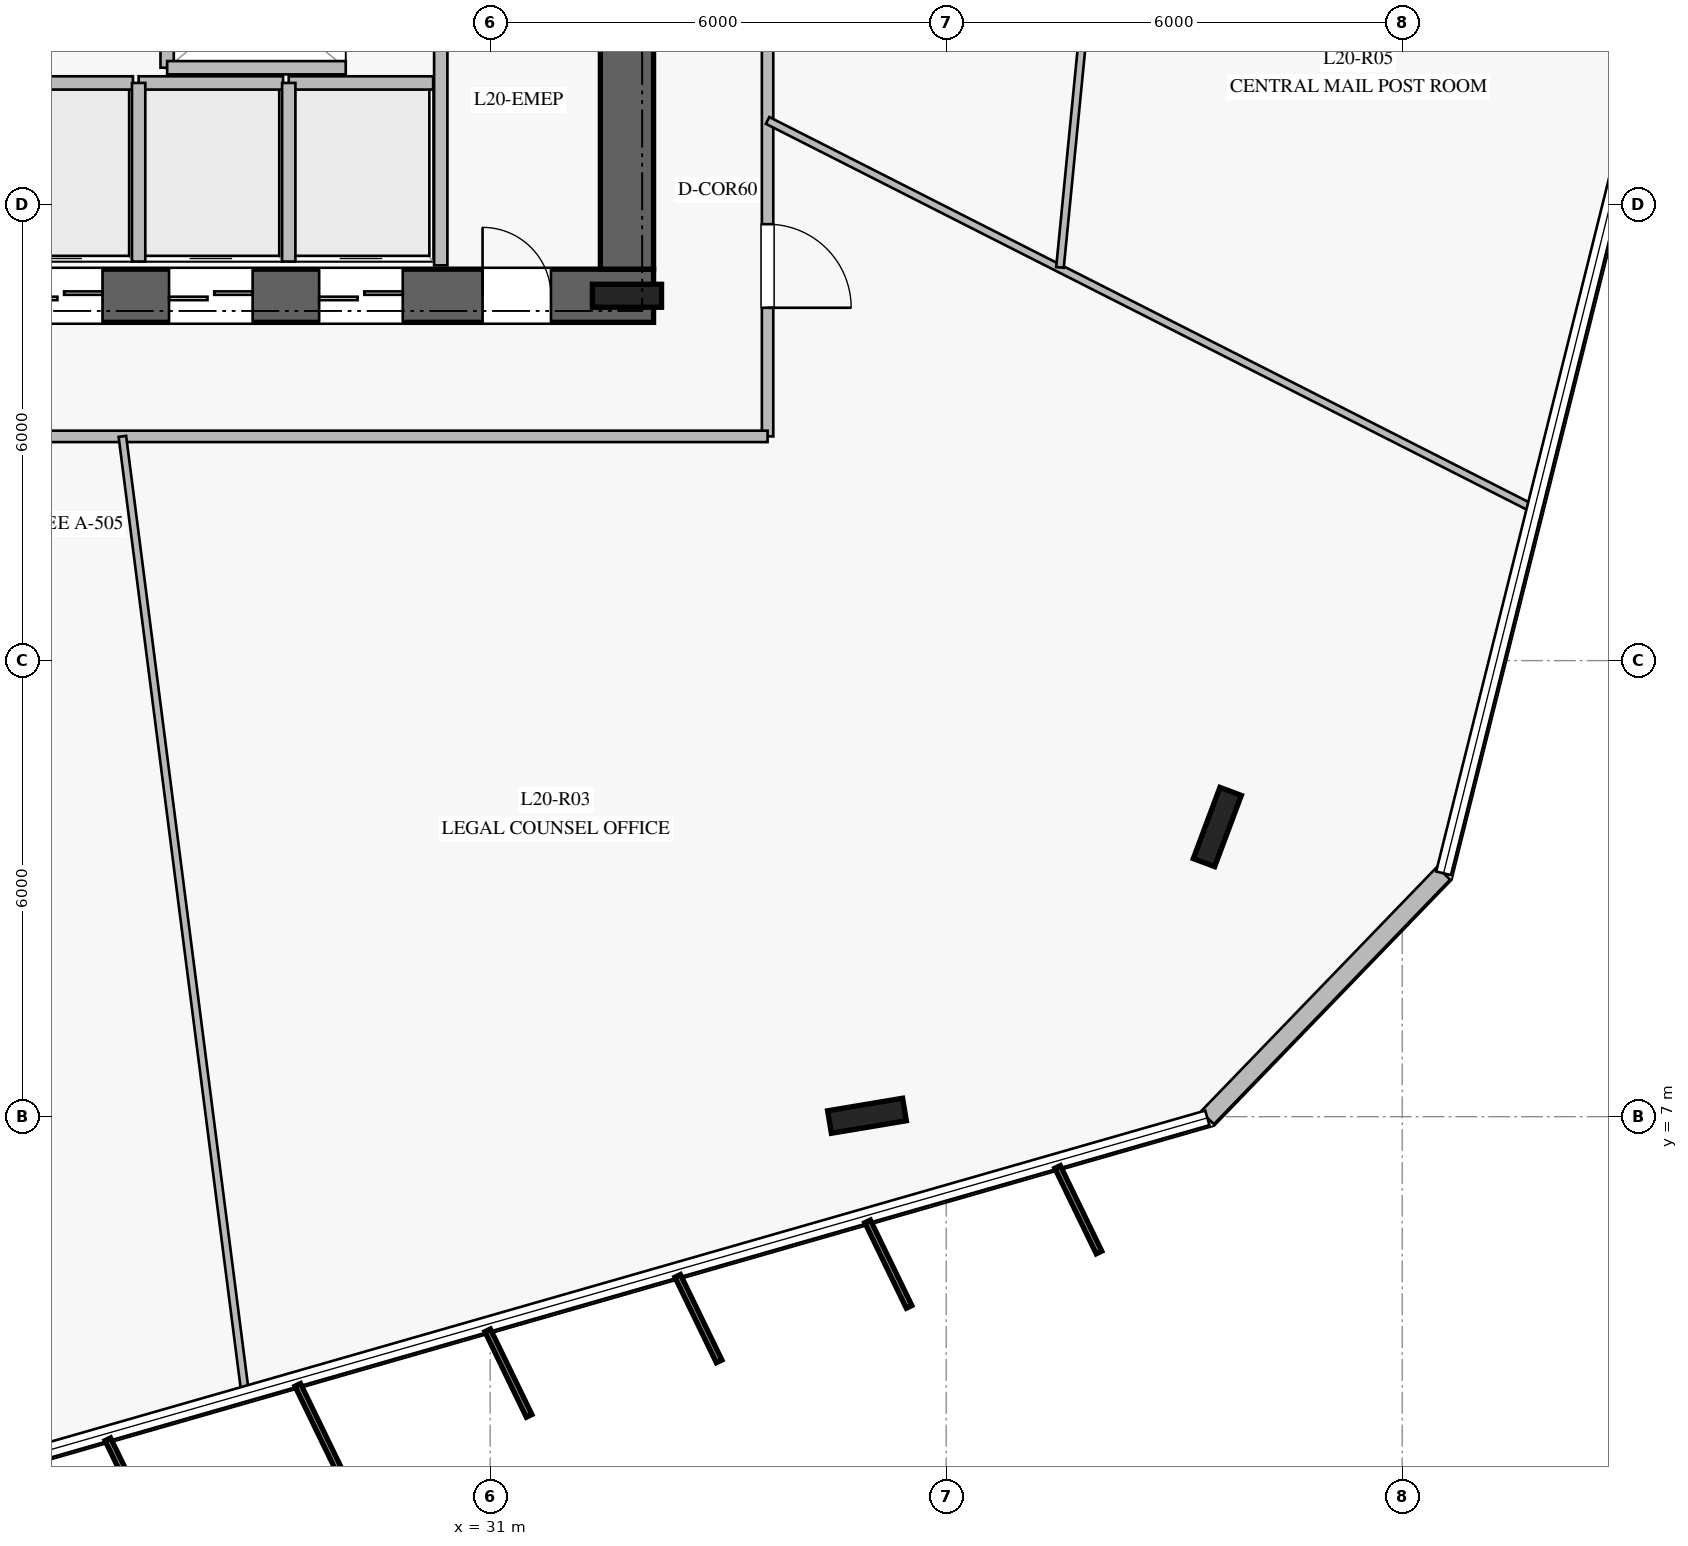
"""IFC4 building model, lengths in metres.
Left out: names, types, materials, properties, quantities, classifications, styles, units other than length and angle.
Written with IfcOpenShell. Run it as: python <this file> out.ifc"""

import sys

from ifc_helpers import new_model, si_unit, direction, frame, frame_2d, origin, origin_2d, place, context, subcontext, project, spatial, rectangle, i_section, extrude, element, fill, save


model = new_model("IFC4")
c1 = context("Model", 3, precision=1e-05, world=origin(), true_north=direction((0.0, 1.0)))
c2 = subcontext(c1, "Body", "Model", "MODEL_VIEW")
j1 = project(units=[si_unit("LENGTHUNIT", "METRE"), si_unit("PLANEANGLEUNIT", "RADIAN")], contexts=[c1])
p1 = place(None, origin())
s1 = spatial("IfcSite", under=j1, at=p1, CompositionType="ELEMENT")
p2 = place(p1, origin())
s2 = spatial("IfcBuilding", under=s1, at=p2, CompositionType="ELEMENT")
p3 = place(p2, frame((0.0, 0.0, 84.0)))
s3 = spatial("IfcBuildingStorey", under=s2, at=p3, CompositionType="ELEMENT", Elevation=84.0)
p4 = place(p3, frame((16.85, 17.8, 0.0), z_axis=(0.0, 0.0, 1.0), x_axis=(1.0, 0.0, 0.0)))
e1 = element("IfcWall", 1, at=p4, inside=s3, PredefinedType="SHEAR", context=c2, shape_type="SweptSolid", body=[
    extrude(rectangle(XDim=16.3, YDim=0.7, at=frame_2d((8.15, 0.0))), origin(), (0.0, 0.0, 1.0), 3.76),
])
p5 = place(p4, frame((5.1, 0.0, 0.0)))
e2 = element("IfcOpeningElement", 2, at=p5, cuts=e1, PredefinedType="OPENING", context=c2, shape_type="SweptSolid", body=[
    extrude(rectangle(XDim=1.2, YDim=2.25, at=frame_2d((0.6, 1.125))), frame((0.0, 0.36, 0.0), z_axis=(0.0, -1.0, 0.0), x_axis=(1.0, 0.0, 0.0)), (0.0, 0.0, 1.0), 0.72),
])
p6 = place(p4, frame((14.05, 0.0, 0.0)))
e3 = element("IfcOpeningElement", 3, at=p6, cuts=e1, PredefinedType="OPENING", context=c2, shape_type="SweptSolid", body=[
    extrude(rectangle(XDim=0.9, YDim=2.1, at=frame_2d((0.45, 1.05))), frame((0.0, 0.36, 0.0), z_axis=(0.0, -1.0, 0.0), x_axis=(1.0, 0.0, 0.0)), (0.0, 0.0, 1.0), 0.72),
])
p7 = place(p4, frame((7.95, 0.0, 0.0)))
e4 = element("IfcOpeningElement", 4, at=p7, cuts=e1, PredefinedType="OPENING", context=c2, shape_type="SweptSolid", body=[
    extrude(rectangle(XDim=1.1, YDim=2.2, at=frame_2d((0.55, 1.1))), frame((0.0, 0.36, 0.0), z_axis=(0.0, -1.0, 0.0), x_axis=(1.0, 0.0, 0.0)), (0.0, 0.0, 1.0), 0.72),
])
p8 = place(p4, frame((9.925, 0.0, 0.0)))
e5 = element("IfcOpeningElement", 5, at=p8, cuts=e1, PredefinedType="OPENING", context=c2, shape_type="SweptSolid", body=[
    extrude(rectangle(XDim=1.1, YDim=2.2, at=frame_2d((0.55, 1.1))), frame((0.0, 0.36, 0.0), z_axis=(0.0, -1.0, 0.0), x_axis=(1.0, 0.0, 0.0)), (0.0, 0.0, 1.0), 0.72),
])
p9 = place(p4, frame((11.9, 0.0, 0.0)))
e6 = element("IfcOpeningElement", 6, at=p9, cuts=e1, PredefinedType="OPENING", context=c2, shape_type="SweptSolid", body=[
    extrude(rectangle(XDim=1.1, YDim=2.2, at=frame_2d((0.55, 1.1))), frame((0.0, 0.36, 0.0), z_axis=(0.0, -1.0, 0.0), x_axis=(1.0, 0.0, 0.0)), (0.0, 0.0, 1.0), 0.72),
])
p10 = place(p3, frame((32.8, 18.15, 0.0), z_axis=(0.0, 0.0, 1.0), x_axis=(0.0, 1.0, 0.0)))
e7 = element("IfcWall", 7, at=p10, inside=s3, PredefinedType="SHEAR", context=c2, shape_type="SweptSolid", body=[
    extrude(rectangle(XDim=13.7, YDim=0.7, at=frame_2d((6.85, 0.0))), origin(), (0.0, 0.0, 1.0), 3.76),
])
p11 = place(p3, frame((32.8, 17.8, 0.0), z_axis=(0.0, 0.0, 1.0), x_axis=(1.0, 0.0, 0.0)))
e8 = element("IfcColumn", 8, at=p11, inside=s3, PredefinedType="COLUMN", context=c2, shape_type="SweptSolid", body=[
    extrude(i_section(OverallWidth=0.302, OverallDepth=0.91, WebThickness=0.021, FlangeThickness=0.04, at=origin_2d()), origin(), (0.0, 0.0, 1.0), 4.0),
])
for number, where, z_axis, x_axis in (
    (9, (35.958, 7.012, 0.0), (0.0, 0.0, 1.0), (0.986, 0.165, 0.0)),
    (10, (40.567, 10.811, 0.0), (0.0, 0.0, 1.0), (0.35, 0.937, 0.0)),
):
    element("IfcColumn", number, at=place(p3, frame(where, z_axis=z_axis, x_axis=x_axis)), inside=s3, PredefinedType="COLUMN", context=c2, shape_type="SweptSolid", body=[
        extrude(i_section(OverallWidth=0.3, OverallDepth=1.0, WebThickness=0.019, FlangeThickness=0.036, at=origin_2d()), origin(), (0.0, 0.0, 1.0), 4.0),
    ])
p12 = place(p3, frame((40.436, 6.984, 0.0), z_axis=(0.0, 0.0, 1.0), x_axis=(0.694693843806, 0.719305542435, 0.0)))
e11 = element("IfcWall", 11, at=p12, inside=s3, PredefinedType="STANDARD", context=c2, shape_type="SweptSolid", body=[
    extrude(rectangle(XDim=4.474, YDim=0.24, at=frame_2d((2.237, 0.0))), origin(), (0.0, 0.0, 1.0), 3.76),
])
p13 = place(p3, frame((30.35, 18.2, 0.0), z_axis=(0.0, 0.0, 1.0), x_axis=(0.0, 1.0, 0.0)))
e12 = element("IfcWall", 12, at=p13, inside=s3, PredefinedType="PARTITIONING", context=c2, shape_type="SweptSolid", body=[
    extrude(rectangle(XDim=3.48, YDim=0.175, at=frame_2d((1.74, 0.0))), origin(), (0.0, 0.0, 1.0), 3.76),
])
p14 = place(p3, frame((24.4, 20.6, 0.0), z_axis=(0.0, 0.0, 1.0), x_axis=(1.0, 0.0, 0.0)))
e13 = element("IfcWall", 13, at=p14, inside=s3, PredefinedType="PARTITIONING", context=c2, shape_type="SweptSolid", body=[
    extrude(rectangle(XDim=1.9, YDim=0.175, at=frame_2d((0.95, 0.0))), origin(), (0.0, 0.0, 1.0), 3.76),
])
p15 = place(p3, frame((26.375, 20.6, 0.0), z_axis=(0.0, 0.0, 1.0), x_axis=(1.0, 0.0, 0.0)))
e14 = element("IfcWall", 14, at=p15, inside=s3, PredefinedType="PARTITIONING", context=c2, shape_type="SweptSolid", body=[
    extrude(rectangle(XDim=1.9, YDim=0.175, at=frame_2d((0.95, 0.0))), origin(), (0.0, 0.0, 1.0), 3.76),
])
p16 = place(p3, frame((26.375, 18.25, 0.0), z_axis=(0.0, 0.0, 1.0), x_axis=(0.0, 1.0, 0.0)))
e15 = element("IfcWall", 15, at=p16, inside=s3, PredefinedType="PARTITIONING", context=c2, shape_type="SweptSolid", body=[
    extrude(rectangle(XDim=2.35, YDim=0.175, at=frame_2d((1.175, 0.0))), origin(), (0.0, 0.0, 1.0), 3.76),
])
p17 = place(p3, frame((28.35, 20.6, 0.0), z_axis=(0.0, 0.0, 1.0), x_axis=(1.0, 0.0, 0.0)))
e16 = element("IfcWall", 16, at=p17, inside=s3, PredefinedType="PARTITIONING", context=c2, shape_type="SweptSolid", body=[
    extrude(rectangle(XDim=1.9, YDim=0.175, at=frame_2d((0.95, 0.0))), origin(), (0.0, 0.0, 1.0), 3.76),
])
p18 = place(p3, frame((28.35, 18.25, 0.0), z_axis=(0.0, 0.0, 1.0), x_axis=(0.0, 1.0, 0.0)))
e17 = element("IfcWall", 17, at=p18, inside=s3, PredefinedType="PARTITIONING", context=c2, shape_type="SweptSolid", body=[
    extrude(rectangle(XDim=2.35, YDim=0.175, at=frame_2d((1.175, 0.0))), origin(), (0.0, 0.0, 1.0), 3.76),
])
p19 = place(p3, frame((26.75, 20.8, 0.0), z_axis=(0.0, 0.0, 1.0), x_axis=(0.0, 1.0, 0.0)))
e18 = element("IfcWall", 18, at=p19, inside=s3, PredefinedType="PARTITIONING", context=c2, shape_type="SweptSolid", body=[
    extrude(rectangle(XDim=1.9, YDim=0.175, at=frame_2d((0.95, 0.0))), origin(), (0.0, 0.0, 1.0), 3.76),
])
p20 = place(p3, frame((26.75, 20.8, 0.0), z_axis=(0.0, 0.0, 1.0), x_axis=(1.0, 0.0, 0.0)))
e19 = element("IfcWall", 19, at=p20, inside=s3, PredefinedType="PARTITIONING", context=c2, shape_type="SweptSolid", body=[
    extrude(rectangle(XDim=2.35, YDim=0.175, at=frame_2d((1.175, 0.0))), origin(), (0.0, 0.0, 1.0), 3.76),
])
p21 = place(p3, frame((34.65, 34.05, 0.0), z_axis=(0.0, 0.0, 1.0), x_axis=(0.0, -1.0, 0.0)))
e20 = element("IfcWall", 20, at=p21, inside=s3, PredefinedType="PARTITIONING", context=c2, shape_type="SweptSolid", body=[
    extrude(rectangle(XDim=18.1, YDim=0.15, at=frame_2d((9.05, 0.0))), origin(), (0.0, 0.0, 1.0), 3.21),
])
p22 = place(p21, frame((15.308, 0.0, 0.0)))
e21 = element("IfcOpeningElement", 21, at=p22, cuts=e20, PredefinedType="OPENING", context=c2, shape_type="SweptSolid", body=[
    extrude(rectangle(XDim=1.1, YDim=2.2, at=frame_2d((0.55, 1.1))), frame((0.0, 0.085, 0.0), z_axis=(0.0, -1.0, 0.0), x_axis=(1.0, 0.0, 0.0)), (0.0, 0.0, 1.0), 0.17),
])
p23 = place(p21, frame((10.056, 0.0, 0.0)))
e22 = element("IfcOpeningElement", 22, at=p23, cuts=e20, PredefinedType="OPENING", context=c2, shape_type="SweptSolid", body=[
    extrude(rectangle(XDim=1.1, YDim=2.2, at=frame_2d((0.55, 1.1))), frame((0.0, 0.085, 0.0), z_axis=(0.0, -1.0, 0.0), x_axis=(1.0, 0.0, 0.0)), (0.0, 0.0, 1.0), 0.17),
])
p24 = place(p3, frame((34.65, 15.95, 0.0), z_axis=(0.0, 0.0, 1.0), x_axis=(-1.0, 0.0, 0.0)))
e23 = element("IfcWall", 23, at=p24, inside=s3, PredefinedType="PARTITIONING", context=c2, shape_type="SweptSolid", body=[
    extrude(rectangle(XDim=19.3, YDim=0.15, at=frame_2d((9.65, 0.0))), origin(), (0.0, 0.0, 1.0), 3.21),
])
p25 = place(p24, frame((16.977, 0.0, 0.0)))
e24 = element("IfcOpeningElement", 24, at=p25, cuts=e23, PredefinedType="OPENING", context=c2, shape_type="SweptSolid", body=[
    extrude(rectangle(XDim=1.1, YDim=2.2, at=frame_2d((0.55, 1.1))), frame((0.0, 0.085, 0.0), z_axis=(0.0, -1.0, 0.0), x_axis=(1.0, 0.0, 0.0)), (0.0, 0.0, 1.0), 0.17),
])
p26 = place(p24, frame((11.66, 0.0, 0.0)))
e25 = element("IfcOpeningElement", 25, at=p26, cuts=e23, PredefinedType="OPENING", context=c2, shape_type="SweptSolid", body=[
    extrude(rectangle(XDim=1.1, YDim=2.2, at=frame_2d((0.55, 1.1))), frame((0.0, 0.085, 0.0), z_axis=(0.0, -1.0, 0.0), x_axis=(1.0, 0.0, 0.0)), (0.0, 0.0, 1.0), 0.17),
])
p27 = place(p3, frame((26.161, 15.95, 0.0), z_axis=(0.0, 0.0, 1.0), x_axis=(0.127277961903, -0.991867088079, 0.0)))
e26 = element("IfcWall", 26, at=p27, inside=s3, PredefinedType="MOVABLE", context=c2, shape_type="SweptSolid", body=[
    extrude(rectangle(XDim=12.681, YDim=0.1, at=frame_2d((6.34, 0.0))), origin(), (0.0, 0.0, 1.0), 3.05),
])
p28 = place(p3, frame((34.65, 20.107, 0.0), z_axis=(0.0, 0.0, 1.0), x_axis=(0.891900925877, -0.452230846382, 0.0)))
e27 = element("IfcWall", 27, at=p28, inside=s3, PredefinedType="MOVABLE", context=c2, shape_type="SweptSolid", body=[
    extrude(rectangle(XDim=11.293, YDim=0.1, at=frame_2d((5.646, 0.0))), origin(), (0.0, 0.0, 1.0), 3.06),
])
p29 = place(p3, frame((38.497, 18.173, 0.0), z_axis=(0.0, 0.0, 1.0), x_axis=(0.097826461563, 0.995203488447, 0.0)))
e28 = element("IfcWall", 28, at=p29, inside=s3, PredefinedType="MOVABLE", context=c2, shape_type="SweptSolid", body=[
    extrude(rectangle(XDim=9.556, YDim=0.1, at=frame_2d((4.778, 0.0))), origin(), (0.0, 0.0, 1.0), 3.76),
])
p30 = place(p29, frame((4.278, 0.0, 0.0)))
e29 = element("IfcOpeningElement", 29, at=p30, cuts=e28, PredefinedType="OPENING", context=c2, shape_type="SweptSolid", body=[
    extrude(rectangle(XDim=1.0, YDim=2.15, at=frame_2d((0.5, 1.075))), frame((0.0, 0.06, 0.0), z_axis=(0.0, -1.0, 0.0), x_axis=(1.0, 0.0, 0.0)), (0.0, 0.0, 1.0), 0.12),
])
p31 = place(p6, origin())
e30 = element("IfcDoor", 30, at=p31, inside=s3, OperationType="SINGLE_SWING_LEFT", PredefinedType="DOOR", context=c2, shape_type="SweptSolid", body=[
    extrude(rectangle(XDim=0.9, YDim=2.1, at=frame_2d((0.45, 1.05))), frame((0.0, 0.025, 0.0), z_axis=(0.0, -1.0, 0.0), x_axis=(1.0, 0.0, 0.0)), (0.0, 0.0, 1.0), 0.05),
])
fill(e3, e30)
p32 = place(p7, origin())
e31 = element("IfcDoor", 31, at=p32, inside=s3, OperationType="DOUBLE_DOOR_SLIDING", PredefinedType="DOOR", context=c2, shape_type="SweptSolid", body=[
    extrude(rectangle(XDim=1.1, YDim=2.2, at=frame_2d((0.55, 1.1))), frame((0.0, 0.025, 0.0), z_axis=(0.0, -1.0, 0.0), x_axis=(1.0, 0.0, 0.0)), (0.0, 0.0, 1.0), 0.05),
])
fill(e4, e31)
p33 = place(p8, origin())
e32 = element("IfcDoor", 32, at=p33, inside=s3, OperationType="DOUBLE_DOOR_SLIDING", PredefinedType="DOOR", context=c2, shape_type="SweptSolid", body=[
    extrude(rectangle(XDim=1.1, YDim=2.2, at=frame_2d((0.55, 1.1))), frame((0.0, 0.025, 0.0), z_axis=(0.0, -1.0, 0.0), x_axis=(1.0, 0.0, 0.0)), (0.0, 0.0, 1.0), 0.05),
])
fill(e5, e32)
p34 = place(p9, origin())
e33 = element("IfcDoor", 33, at=p34, inside=s3, OperationType="DOUBLE_DOOR_SLIDING", PredefinedType="DOOR", context=c2, shape_type="SweptSolid", body=[
    extrude(rectangle(XDim=1.1, YDim=2.2, at=frame_2d((0.55, 1.1))), frame((0.0, 0.025, 0.0), z_axis=(0.0, -1.0, 0.0), x_axis=(1.0, 0.0, 0.0)), (0.0, 0.0, 1.0), 0.05),
])
fill(e6, e33)
p35 = place(p22, origin())
e34 = element("IfcDoor", 34, at=p35, inside=s3, OperationType="SINGLE_SWING_RIGHT", PredefinedType="DOOR", context=c2, shape_type="SweptSolid", body=[
    extrude(rectangle(XDim=1.1, YDim=2.2, at=frame_2d((0.55, 1.1))), frame((0.0, 0.025, 0.0), z_axis=(0.0, -1.0, 0.0), x_axis=(1.0, 0.0, 0.0)), (0.0, 0.0, 1.0), 0.05),
])
fill(e21, e34)
save(model, sys.argv[1])
